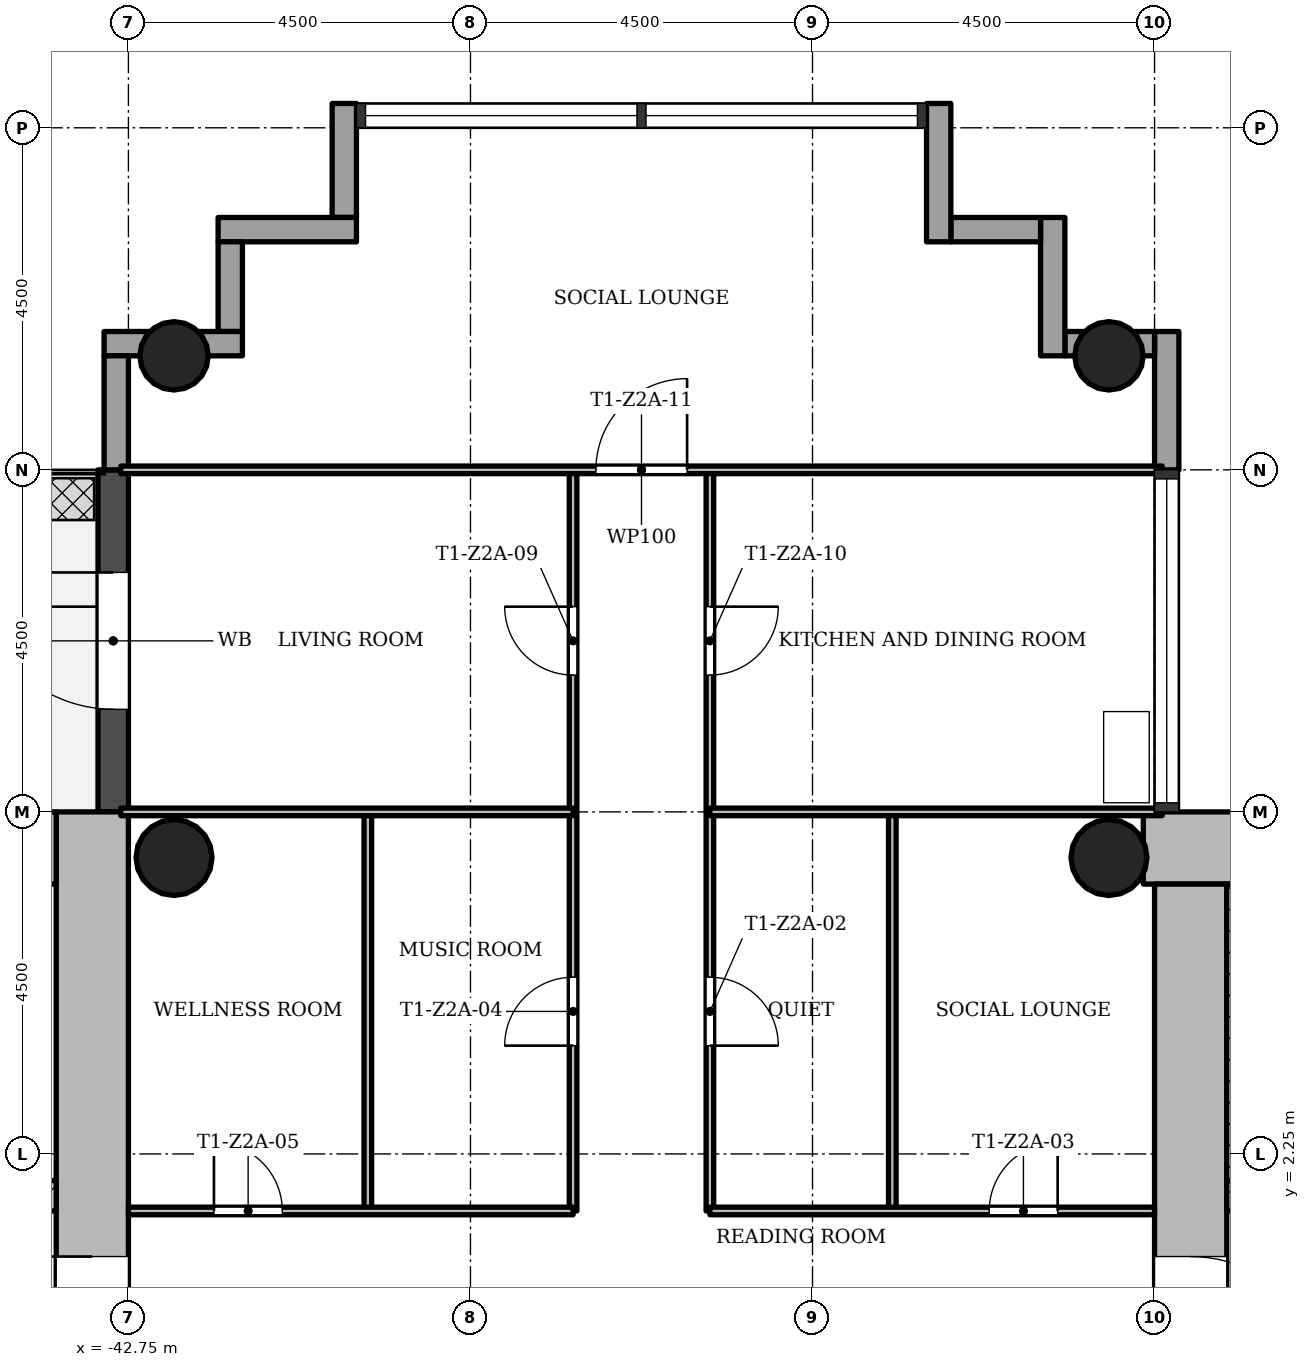
"""IFC4 building model, lengths in metres.
Left out: names, types, materials, properties, quantities, classifications, styles, units other than length and angle.
Written with IfcOpenShell. Run it as: python <this file> out.ifc"""

import sys

from ifc_helpers import new_model, si_unit, direction, frame, frame_2d, origin, origin_2d, place, context, subcontext, project, spatial, rectangle, hollow_circle, extrude, element, fill, save


model = new_model("IFC4")
c1 = context("Model", 3, precision=1e-05, world=origin(), true_north=direction((0.0, 1.0)))
c2 = subcontext(c1, "Body", "Model", "MODEL_VIEW")
j1 = project(units=[si_unit("LENGTHUNIT", "METRE"), si_unit("PLANEANGLEUNIT", "RADIAN")], contexts=[c1])
p1 = place(None, origin())
s1 = spatial("IfcSite", under=j1, at=p1, CompositionType="ELEMENT")
p2 = place(p1, origin())
s2 = spatial("IfcBuilding", under=s1, at=p2, CompositionType="ELEMENT")
p3 = place(p2, frame((0.0, 0.0, 117.4)))
s3 = spatial("IfcBuildingStorey", under=s2, at=p3, CompositionType="ELEMENT", Elevation=117.4)
p4 = place(p3, frame((-20.702, 6.275, 0.0), z_axis=(0.0, 0.0, 1.0), x_axis=(-1.0, 0.0, 0.0)))
e1 = element("IfcWall", 1, at=p4, inside=s3, PredefinedType="SHEAR", context=c2, shape_type="SweptSolid", body=[
    extrude(rectangle(XDim=8.696, YDim=0.95, at=frame_2d((4.348, 0.0))), origin(), (0.0, 0.0, 1.0), 3.4),
])
p5 = place(p3, frame((-28.775, 5.8, 0.0), z_axis=(0.0, 0.0, 1.0), x_axis=(0.0, -1.0, 0.0)))
e2 = element("IfcWall", 2, at=p5, inside=s3, PredefinedType="SHEAR", context=c2, shape_type="SweptSolid", body=[
    extrude(rectangle(XDim=12.55, YDim=0.95, at=frame_2d((6.275, 0.0))), origin(), (0.0, 0.0, 1.0), 3.4),
])
p6 = place(p5, frame((4.9, 0.0, 0.0)))
e3 = element("IfcOpeningElement", 3, at=p6, cuts=e2, PredefinedType="OPENING", context=c2, shape_type="SweptSolid", body=[
    extrude(rectangle(XDim=1.8, YDim=2.1, at=frame_2d((0.9, 1.05))), frame((0.0, 0.485, 0.0), z_axis=(0.0, -1.0, 0.0), x_axis=(1.0, 0.0, 0.0)), (0.0, 0.0, 1.0), 0.97),
])
p7 = place(p3, frame((-28.3, 1.7, 0.0), z_axis=(0.0, 0.0, 1.0), x_axis=(1.0, 0.0, 0.0)))
e4 = element("IfcWall", 4, at=p7, inside=s3, PredefinedType="SHEAR", context=c2, shape_type="SweptSolid", body=[
    extrude(rectangle(XDim=7.1, YDim=0.4, at=frame_2d((3.55, 0.0))), origin(), (0.0, 0.0, 1.0), 3.4),
])
p8 = place(p7, frame((0.7, 0.0, 0.0)))
e5 = element("IfcOpeningElement", 5, at=p8, cuts=e4, PredefinedType="OPENING", context=c2, shape_type="SweptSolid", body=[
    extrude(rectangle(XDim=0.9, YDim=2.1, at=frame_2d((0.45, 1.05))), frame((0.0, 0.21, 0.0), z_axis=(0.0, -1.0, 0.0), x_axis=(1.0, 0.0, 0.0)), (0.0, 0.0, 1.0), 0.42),
])
p9 = place(p3, frame((-43.225, -5.8, 0.0), z_axis=(0.0, 0.0, 1.0), x_axis=(0.0, 1.0, 0.0)))
e6 = element("IfcWall", 6, at=p9, inside=s3, PredefinedType="SHEAR", context=c2, shape_type="SweptSolid", body=[
    extrude(rectangle(XDim=12.55, YDim=0.95, at=frame_2d((6.275, 0.0))), origin(), (0.0, 0.0, 1.0), 3.4),
])
p10 = place(p9, frame((4.9, 0.0, 0.0)))
e7 = element("IfcOpeningElement", 7, at=p10, cuts=e6, PredefinedType="OPENING", context=c2, shape_type="SweptSolid", body=[
    extrude(rectangle(XDim=1.8, YDim=2.1, at=frame_2d((0.9, 1.05))), frame((0.0, 0.485, 0.0), z_axis=(0.0, -1.0, 0.0), x_axis=(1.0, 0.0, 0.0)), (0.0, 0.0, 1.0), 0.97),
])
p11 = place(p3, frame((-43.7, 6.275, 0.0), z_axis=(0.0, 0.0, 1.0), x_axis=(-1.0, 0.0, 0.0)))
e8 = element("IfcWall", 8, at=p11, inside=s3, PredefinedType="SHEAR", context=c2, shape_type="SweptSolid", body=[
    extrude(rectangle(XDim=8.05, YDim=0.95, at=frame_2d((4.025, 0.0))), origin(), (0.0, 0.0, 1.0), 3.4),
])
p12 = place(p3, frame((-50.8, 1.7, 0.0), z_axis=(0.0, 0.0, 1.0), x_axis=(1.0, 0.0, 0.0)))
e9 = element("IfcWall", 9, at=p12, inside=s3, PredefinedType="SHEAR", context=c2, shape_type="SweptSolid", body=[
    extrude(rectangle(XDim=7.1, YDim=0.4, at=frame_2d((3.55, 0.0))), origin(), (0.0, 0.0, 1.0), 3.4),
])
p13 = place(p12, frame((5.2, 0.0, 0.0)))
e10 = element("IfcOpeningElement", 10, at=p13, cuts=e9, PredefinedType="OPENING", context=c2, shape_type="SweptSolid", body=[
    extrude(rectangle(XDim=1.1, YDim=2.1, at=frame_2d((0.55, 1.05))), frame((0.0, 0.21, 0.0), z_axis=(0.0, -1.0, 0.0), x_axis=(1.0, 0.0, 0.0)), (0.0, 0.0, 1.0), 0.42),
])
for number, where, z_axis, x_axis in (
    (11, (-29.85, 12.75, 0.0), (0.0, 0.0, 1.0), (1.0, 0.0, 0.0)),
    (12, (-42.15, 12.75, 0.0), (0.0, 0.0, 1.0), (1.0, 0.0, 0.0)),
):
    element("IfcColumn", number, at=place(p3, frame(where, z_axis=z_axis, x_axis=x_axis)), inside=s3, PredefinedType="COLUMN", context=c2, shape_type="SweptSolid", body=[
        extrude(hollow_circle(Radius=0.45, WallThickness=0.032, at=origin_2d()), origin(), (0.0, 0.0, 1.0), 3.4),
    ])
for number, where, z_axis, x_axis in (
    (13, (-29.85, 6.15, 0.0), (0.0, 0.0, 1.0), (1.0, 0.0, 0.0)),
    (14, (-42.15, 6.15, 0.0), (0.0, 0.0, 1.0), (1.0, 0.0, 0.0)),
):
    element("IfcColumn", number, at=place(p3, frame(where, z_axis=z_axis, x_axis=x_axis)), inside=s3, PredefinedType="COLUMN", context=c2, shape_type="SweptSolid", body=[
        extrude(hollow_circle(Radius=0.5, WallThickness=0.036, at=origin_2d()), origin(), (0.0, 0.0, 1.0), 3.4),
    ])
p14 = place(p3, frame((-29.09, 11.25, -0.3), z_axis=(0.0, 0.0, 1.0), x_axis=(0.0, 1.0, 0.0)))
e15 = element("IfcWall", 15, at=p14, inside=s3, PredefinedType="STANDARD", context=c2, shape_type="SweptSolid", body=[
    extrude(rectangle(XDim=1.82, YDim=0.32, at=frame_2d((0.91, 0.0))), origin(), (0.0, 0.0, 1.0), 3.4),
])
p15 = place(p3, frame((-29.25, 12.91, -0.3), z_axis=(0.0, 0.0, 1.0), x_axis=(-1.0, 0.0, 0.0)))
e16 = element("IfcWall", 16, at=p15, inside=s3, PredefinedType="STANDARD", context=c2, shape_type="SweptSolid", body=[
    extrude(rectangle(XDim=1.18, YDim=0.32, at=frame_2d((0.59, 0.0))), origin(), (0.0, 0.0, 1.0), 3.4),
])
p16 = place(p3, frame((-30.59, 12.75, -0.3), z_axis=(0.0, 0.0, 1.0), x_axis=(0.0, 1.0, 0.0)))
e17 = element("IfcWall", 17, at=p16, inside=s3, PredefinedType="STANDARD", context=c2, shape_type="SweptSolid", body=[
    extrude(rectangle(XDim=1.82, YDim=0.32, at=frame_2d((0.91, 0.0))), origin(), (0.0, 0.0, 1.0), 3.4),
])
p17 = place(p3, frame((-30.75, 14.41, -0.3), z_axis=(0.0, 0.0, 1.0), x_axis=(-1.0, 0.0, 0.0)))
e18 = element("IfcWall", 18, at=p17, inside=s3, PredefinedType="STANDARD", context=c2, shape_type="SweptSolid", body=[
    extrude(rectangle(XDim=1.18, YDim=0.32, at=frame_2d((0.59, 0.0))), origin(), (0.0, 0.0, 1.0), 3.4),
])
p18 = place(p3, frame((-32.09, 14.25, -0.3), z_axis=(0.0, 0.0, 1.0), x_axis=(0.0, 1.0, 0.0)))
e19 = element("IfcWall", 19, at=p18, inside=s3, PredefinedType="STANDARD", context=c2, shape_type="SweptSolid", body=[
    extrude(rectangle(XDim=1.82, YDim=0.32, at=frame_2d((0.91, 0.0))), origin(), (0.0, 0.0, 1.0), 3.4),
])
p19 = place(p3, frame((-39.91, 16.07, -0.3), z_axis=(0.0, 0.0, 1.0), x_axis=(0.0, -1.0, 0.0)))
e20 = element("IfcWall", 20, at=p19, inside=s3, PredefinedType="STANDARD", context=c2, shape_type="SweptSolid", body=[
    extrude(rectangle(XDim=1.5, YDim=0.32, at=frame_2d((0.75, 0.0))), origin(), (0.0, 0.0, 1.0), 3.4),
])
p20 = place(p3, frame((-39.75, 14.41, -0.3), z_axis=(0.0, 0.0, 1.0), x_axis=(-1.0, 0.0, 0.0)))
e21 = element("IfcWall", 21, at=p20, inside=s3, PredefinedType="STANDARD", context=c2, shape_type="SweptSolid", body=[
    extrude(rectangle(XDim=1.82, YDim=0.32, at=frame_2d((0.91, 0.0))), origin(), (0.0, 0.0, 1.0), 3.4),
])
p21 = place(p3, frame((-41.41, 14.25, -0.3), z_axis=(0.0, 0.0, 1.0), x_axis=(0.0, -1.0, 0.0)))
e22 = element("IfcWall", 22, at=p21, inside=s3, PredefinedType="STANDARD", context=c2, shape_type="SweptSolid", body=[
    extrude(rectangle(XDim=1.18, YDim=0.32, at=frame_2d((0.59, 0.0))), origin(), (0.0, 0.0, 1.0), 3.4),
])
p22 = place(p3, frame((-41.25, 12.91, -0.3), z_axis=(0.0, 0.0, 1.0), x_axis=(-1.0, 0.0, 0.0)))
e23 = element("IfcWall", 23, at=p22, inside=s3, PredefinedType="STANDARD", context=c2, shape_type="SweptSolid", body=[
    extrude(rectangle(XDim=1.82, YDim=0.32, at=frame_2d((0.91, 0.0))), origin(), (0.0, 0.0, 1.0), 3.4),
])
p23 = place(p3, frame((-42.91, 12.75, -0.3), z_axis=(0.0, 0.0, 1.0), x_axis=(0.0, -1.0, 0.0)))
e24 = element("IfcWall", 24, at=p23, inside=s3, PredefinedType="STANDARD", context=c2, shape_type="SweptSolid", body=[
    extrude(rectangle(XDim=1.5, YDim=0.32, at=frame_2d((0.75, 0.0))), origin(), (0.0, 0.0, 1.0), 3.4),
])
p24 = place(p3, frame((-42.95, 11.25, -0.02), z_axis=(0.0, 0.0, 1.0), x_axis=(0.0, -1.0, 0.0)))
e25 = element("IfcWall", 25, at=p24, inside=s3, PredefinedType="STANDARD", context=c2, shape_type="SweptSolid", body=[
    extrude(rectangle(XDim=4.5, YDim=0.4, at=frame_2d((2.25, 0.0))), origin(), (0.0, 0.0, 1.0), 3.12),
])
p25 = place(p24, frame((1.35, 0.0, 0.02)))
e26 = element("IfcOpeningElement", 26, at=p25, cuts=e25, PredefinedType="OPENING", context=c2, shape_type="SweptSolid", body=[
    extrude(rectangle(XDim=1.8, YDim=2.1, at=frame_2d((0.9, 1.05))), frame((0.0, 0.21, 0.0), z_axis=(0.0, -1.0, 0.0), x_axis=(1.0, 0.0, 0.0)), (0.0, 0.0, 1.0), 0.42),
])
p26 = place(p3, frame((-39.6, 1.5, 0.0), z_axis=(0.0, 0.0, 1.0), x_axis=(0.0, 1.0, 0.0)))
e27 = element("IfcWall", 27, at=p26, inside=s3, PredefinedType="PARTITIONING", context=c2, shape_type="SweptSolid", body=[
    extrude(rectangle(XDim=5.25, YDim=0.1, at=frame_2d((2.625, 0.0))), origin(), (0.0, 0.0, 1.0), 3.0),
])
p27 = place(p3, frame((-36.9, 1.5, 0.0), z_axis=(0.0, 0.0, 1.0), x_axis=(0.0, 1.0, 0.0)))
e28 = element("IfcWall", 28, at=p27, inside=s3, PredefinedType="PARTITIONING", context=c2, shape_type="SweptSolid", body=[
    extrude(rectangle(XDim=9.75, YDim=0.1, at=frame_2d((4.875, 0.0))), origin(), (0.0, 0.0, 1.0), 3.0),
])
p28 = place(p27, frame((2.175, 0.0, 0.0)))
e29 = element("IfcOpeningElement", 29, at=p28, cuts=e28, PredefinedType="OPENING", context=c2, shape_type="SweptSolid", body=[
    extrude(rectangle(XDim=0.9, YDim=2.1, at=frame_2d((0.45, 1.05))), frame((0.0, 0.06, 0.0), z_axis=(0.0, -1.0, 0.0), x_axis=(1.0, 0.0, 0.0)), (0.0, 0.0, 1.0), 0.12),
])
p29 = place(p27, frame((7.05, 0.0, 0.0)))
e30 = element("IfcOpeningElement", 30, at=p29, cuts=e28, PredefinedType="OPENING", context=c2, shape_type="SweptSolid", body=[
    extrude(rectangle(XDim=0.9, YDim=2.1, at=frame_2d((0.45, 1.05))), frame((0.0, 0.06, 0.0), z_axis=(0.0, -1.0, 0.0), x_axis=(1.0, 0.0, 0.0)), (0.0, 0.0, 1.0), 0.12),
])
p30 = place(p3, frame((-35.1, 1.5, 0.0), z_axis=(0.0, 0.0, 1.0), x_axis=(0.0, 1.0, 0.0)))
e31 = element("IfcWall", 31, at=p30, inside=s3, PredefinedType="PARTITIONING", context=c2, shape_type="SweptSolid", body=[
    extrude(rectangle(XDim=9.75, YDim=0.1, at=frame_2d((4.875, 0.0))), origin(), (0.0, 0.0, 1.0), 3.0),
])
p31 = place(p30, frame((2.175, 0.0, 0.0)))
e32 = element("IfcOpeningElement", 32, at=p31, cuts=e31, PredefinedType="OPENING", context=c2, shape_type="SweptSolid", body=[
    extrude(rectangle(XDim=0.9, YDim=2.1, at=frame_2d((0.45, 1.05))), frame((0.0, 0.06, 0.0), z_axis=(0.0, -1.0, 0.0), x_axis=(1.0, 0.0, 0.0)), (0.0, 0.0, 1.0), 0.12),
])
p32 = place(p30, frame((7.05, 0.0, 0.0)))
e33 = element("IfcOpeningElement", 33, at=p32, cuts=e31, PredefinedType="OPENING", context=c2, shape_type="SweptSolid", body=[
    extrude(rectangle(XDim=0.9, YDim=2.1, at=frame_2d((0.45, 1.05))), frame((0.0, 0.06, 0.0), z_axis=(0.0, -1.0, 0.0), x_axis=(1.0, 0.0, 0.0)), (0.0, 0.0, 1.0), 0.12),
])
p33 = place(p3, frame((-32.7, 1.5, 0.0), z_axis=(0.0, 0.0, 1.0), x_axis=(0.0, 1.0, 0.0)))
e34 = element("IfcWall", 34, at=p33, inside=s3, PredefinedType="PARTITIONING", context=c2, shape_type="SweptSolid", body=[
    extrude(rectangle(XDim=5.25, YDim=0.1, at=frame_2d((2.625, 0.0))), origin(), (0.0, 0.0, 1.0), 3.0),
])
p34 = place(p3, frame((-42.75, 1.5, 0.0), z_axis=(0.0, 0.0, 1.0), x_axis=(1.0, 0.0, 0.0)))
e35 = element("IfcWall", 35, at=p34, inside=s3, PredefinedType="PARTITIONING", context=c2, shape_type="SweptSolid", body=[
    extrude(rectangle(XDim=5.85, YDim=0.1, at=frame_2d((2.925, 0.0))), origin(), (0.0, 0.0, 1.0), 3.0),
])
p35 = place(p34, frame((1.125, 0.0, 0.0)))
e36 = element("IfcOpeningElement", 36, at=p35, cuts=e35, PredefinedType="OPENING", context=c2, shape_type="SweptSolid", body=[
    extrude(rectangle(XDim=0.9, YDim=2.1, at=frame_2d((0.45, 1.05))), frame((0.0, 0.06, 0.0), z_axis=(0.0, -1.0, 0.0), x_axis=(1.0, 0.0, 0.0)), (0.0, 0.0, 1.0), 0.12),
])
p36 = place(p3, frame((-35.1, 1.5, 0.0), z_axis=(0.0, 0.0, 1.0), x_axis=(1.0, 0.0, 0.0)))
e37 = element("IfcWall", 37, at=p36, inside=s3, PredefinedType="PARTITIONING", context=c2, shape_type="SweptSolid", body=[
    extrude(rectangle(XDim=5.85, YDim=0.1, at=frame_2d((2.925, 0.0))), origin(), (0.0, 0.0, 1.0), 3.0),
])
p37 = place(p36, frame((3.675, 0.0, 0.0)))
e38 = element("IfcOpeningElement", 38, at=p37, cuts=e37, PredefinedType="OPENING", context=c2, shape_type="SweptSolid", body=[
    extrude(rectangle(XDim=0.9, YDim=2.1, at=frame_2d((0.45, 1.05))), frame((0.0, 0.06, 0.0), z_axis=(0.0, -1.0, 0.0), x_axis=(1.0, 0.0, 0.0)), (0.0, 0.0, 1.0), 0.12),
])
for number, where, z_axis, x_axis in (
    (39, (-42.85, 6.75, 0.0), (0.0, 0.0, 1.0), (1.0, 0.0, 0.0)),
    (40, (-35.1, 6.75, 0.0), (0.0, 0.0, 1.0), (1.0, 0.0, 0.0)),
):
    element("IfcWall", number, at=place(p3, frame(where, z_axis=z_axis, x_axis=x_axis)), inside=s3, PredefinedType="PARTITIONING", context=c2, shape_type="SweptSolid", body=[
        extrude(rectangle(XDim=5.95, YDim=0.1, at=frame_2d((2.975, 0.0))), origin(), (0.0, 0.0, 1.0), 3.0),
    ])
p38 = place(p3, frame((-42.85, 11.25, 0.0), z_axis=(0.0, 0.0, 1.0), x_axis=(1.0, 0.0, 0.0)))
e41 = element("IfcWall", 41, at=p38, inside=s3, PredefinedType="PARTITIONING", context=c2, shape_type="SweptSolid", body=[
    extrude(rectangle(XDim=13.7, YDim=0.1, at=frame_2d((6.85, 0.0))), origin(), (0.0, 0.0, 1.0), 3.0),
])
p39 = place(p38, frame((6.25, 0.0, 0.0)))
e42 = element("IfcOpeningElement", 42, at=p39, cuts=e41, PredefinedType="OPENING", context=c2, shape_type="SweptSolid", body=[
    extrude(rectangle(XDim=1.2, YDim=2.1, at=frame_2d((0.6, 1.05))), frame((0.0, 0.06, 0.0), z_axis=(0.0, -1.0, 0.0), x_axis=(1.0, 0.0, 0.0)), (0.0, 0.0, 1.0), 0.12),
])
p40 = place(p3, frame((-28.175, 1.9, 0.0), z_axis=(0.0, 0.0, 1.0), x_axis=(0.0, 1.0, 0.0)))
e43 = element("IfcWall", 43, at=p40, inside=s3, PredefinedType="SHEAR", context=c2, shape_type="SweptSolid", body=[
    extrude(rectangle(XDim=3.9, YDim=0.25, at=frame_2d((1.95, 0.0))), origin(), (0.0, 0.0, 1.0), 3.4),
])
p41 = place(p25, origin())
e44 = element("IfcDoor", 44, at=p41, inside=s3, OperationType="SINGLE_SWING_LEFT", PredefinedType="DOOR", context=c2, shape_type="SweptSolid", body=[
    extrude(rectangle(XDim=1.8, YDim=2.1, at=frame_2d((0.9, 1.05))), frame((0.0, 0.025, 0.0), z_axis=(0.0, -1.0, 0.0), x_axis=(1.0, 0.0, 0.0)), (0.0, 0.0, 1.0), 0.05),
])
fill(e26, e44)
p42 = place(p31, origin())
e45 = element("IfcDoor", 45, at=p42, inside=s3, OperationType="SINGLE_SWING_LEFT", PredefinedType="DOOR", context=c2, shape_type="SweptSolid", body=[
    extrude(rectangle(XDim=0.9, YDim=2.1, at=frame_2d((0.45, 1.05))), frame((0.0, 0.025, 0.0), z_axis=(0.0, -1.0, 0.0), x_axis=(1.0, 0.0, 0.0)), (0.0, 0.0, 1.0), 0.05),
])
fill(e32, e45)
p43 = place(p37, origin())
e46 = element("IfcDoor", 46, at=p43, inside=s3, OperationType="SINGLE_SWING_LEFT", PredefinedType="DOOR", context=c2, shape_type="SweptSolid", body=[
    extrude(rectangle(XDim=0.9, YDim=2.1, at=frame_2d((0.45, 1.05))), frame((0.0, 0.025, 0.0), z_axis=(0.0, -1.0, 0.0), x_axis=(1.0, 0.0, 0.0)), (0.0, 0.0, 1.0), 0.05),
])
fill(e38, e46)
p44 = place(p28, origin())
e47 = element("IfcDoor", 47, at=p44, inside=s3, OperationType="SINGLE_SWING_RIGHT", PredefinedType="DOOR", context=c2, shape_type="SweptSolid", body=[
    extrude(rectangle(XDim=0.9, YDim=2.1, at=frame_2d((0.45, 1.05))), frame((0.0, 0.025, 0.0), z_axis=(0.0, -1.0, 0.0), x_axis=(1.0, 0.0, 0.0)), (0.0, 0.0, 1.0), 0.05),
])
fill(e29, e47)
p45 = place(p35, origin())
e48 = element("IfcDoor", 48, at=p45, inside=s3, OperationType="SINGLE_SWING_RIGHT", PredefinedType="DOOR", context=c2, shape_type="SweptSolid", body=[
    extrude(rectangle(XDim=0.9, YDim=2.1, at=frame_2d((0.45, 1.05))), frame((0.0, 0.025, 0.0), z_axis=(0.0, -1.0, 0.0), x_axis=(1.0, 0.0, 0.0)), (0.0, 0.0, 1.0), 0.05),
])
fill(e36, e48)
p46 = place(p29, origin())
e49 = element("IfcDoor", 49, at=p46, inside=s3, OperationType="SINGLE_SWING_LEFT", PredefinedType="DOOR", context=c2, shape_type="SweptSolid", body=[
    extrude(rectangle(XDim=0.9, YDim=2.1, at=frame_2d((0.45, 1.05))), frame((0.0, 0.025, 0.0), z_axis=(0.0, -1.0, 0.0), x_axis=(1.0, 0.0, 0.0)), (0.0, 0.0, 1.0), 0.05),
])
fill(e30, e49)
p47 = place(p32, origin())
e50 = element("IfcDoor", 50, at=p47, inside=s3, OperationType="SINGLE_SWING_RIGHT", PredefinedType="DOOR", context=c2, shape_type="SweptSolid", body=[
    extrude(rectangle(XDim=0.9, YDim=2.1, at=frame_2d((0.45, 1.05))), frame((0.0, 0.025, 0.0), z_axis=(0.0, -1.0, 0.0), x_axis=(1.0, 0.0, 0.0)), (0.0, 0.0, 1.0), 0.05),
])
fill(e33, e50)
p48 = place(p39, origin())
e51 = element("IfcDoor", 51, at=p48, inside=s3, OperationType="SINGLE_SWING_LEFT", PredefinedType="DOOR", context=c2, shape_type="SweptSolid", body=[
    extrude(rectangle(XDim=1.2, YDim=2.1, at=frame_2d((0.6, 1.05))), frame((0.0, 0.025, 0.0), z_axis=(0.0, -1.0, 0.0), x_axis=(1.0, 0.0, 0.0)), (0.0, 0.0, 1.0), 0.05),
])
fill(e42, e51)
p49 = place(p6, origin())
e52 = element("IfcDoor", 52, at=p49, inside=s3, OperationType="SINGLE_SWING_LEFT", PredefinedType="DOOR", context=c2, shape_type="SweptSolid", body=[
    extrude(rectangle(XDim=1.8, YDim=2.1, at=frame_2d((0.9, 1.05))), frame((0.0, 0.025, 0.0), z_axis=(0.0, -1.0, 0.0), x_axis=(1.0, 0.0, 0.0)), (0.0, 0.0, 1.0), 0.05),
])
fill(e3, e52)
p50 = place(p10, origin())
e53 = element("IfcDoor", 53, at=p50, inside=s3, OperationType="SINGLE_SWING_LEFT", PredefinedType="DOOR", context=c2, shape_type="SweptSolid", body=[
    extrude(rectangle(XDim=1.8, YDim=2.1, at=frame_2d((0.9, 1.05))), frame((0.0, 0.025, 0.0), z_axis=(0.0, -1.0, 0.0), x_axis=(1.0, 0.0, 0.0)), (0.0, 0.0, 1.0), 0.05),
])
fill(e7, e53)
save(model, sys.argv[1])
